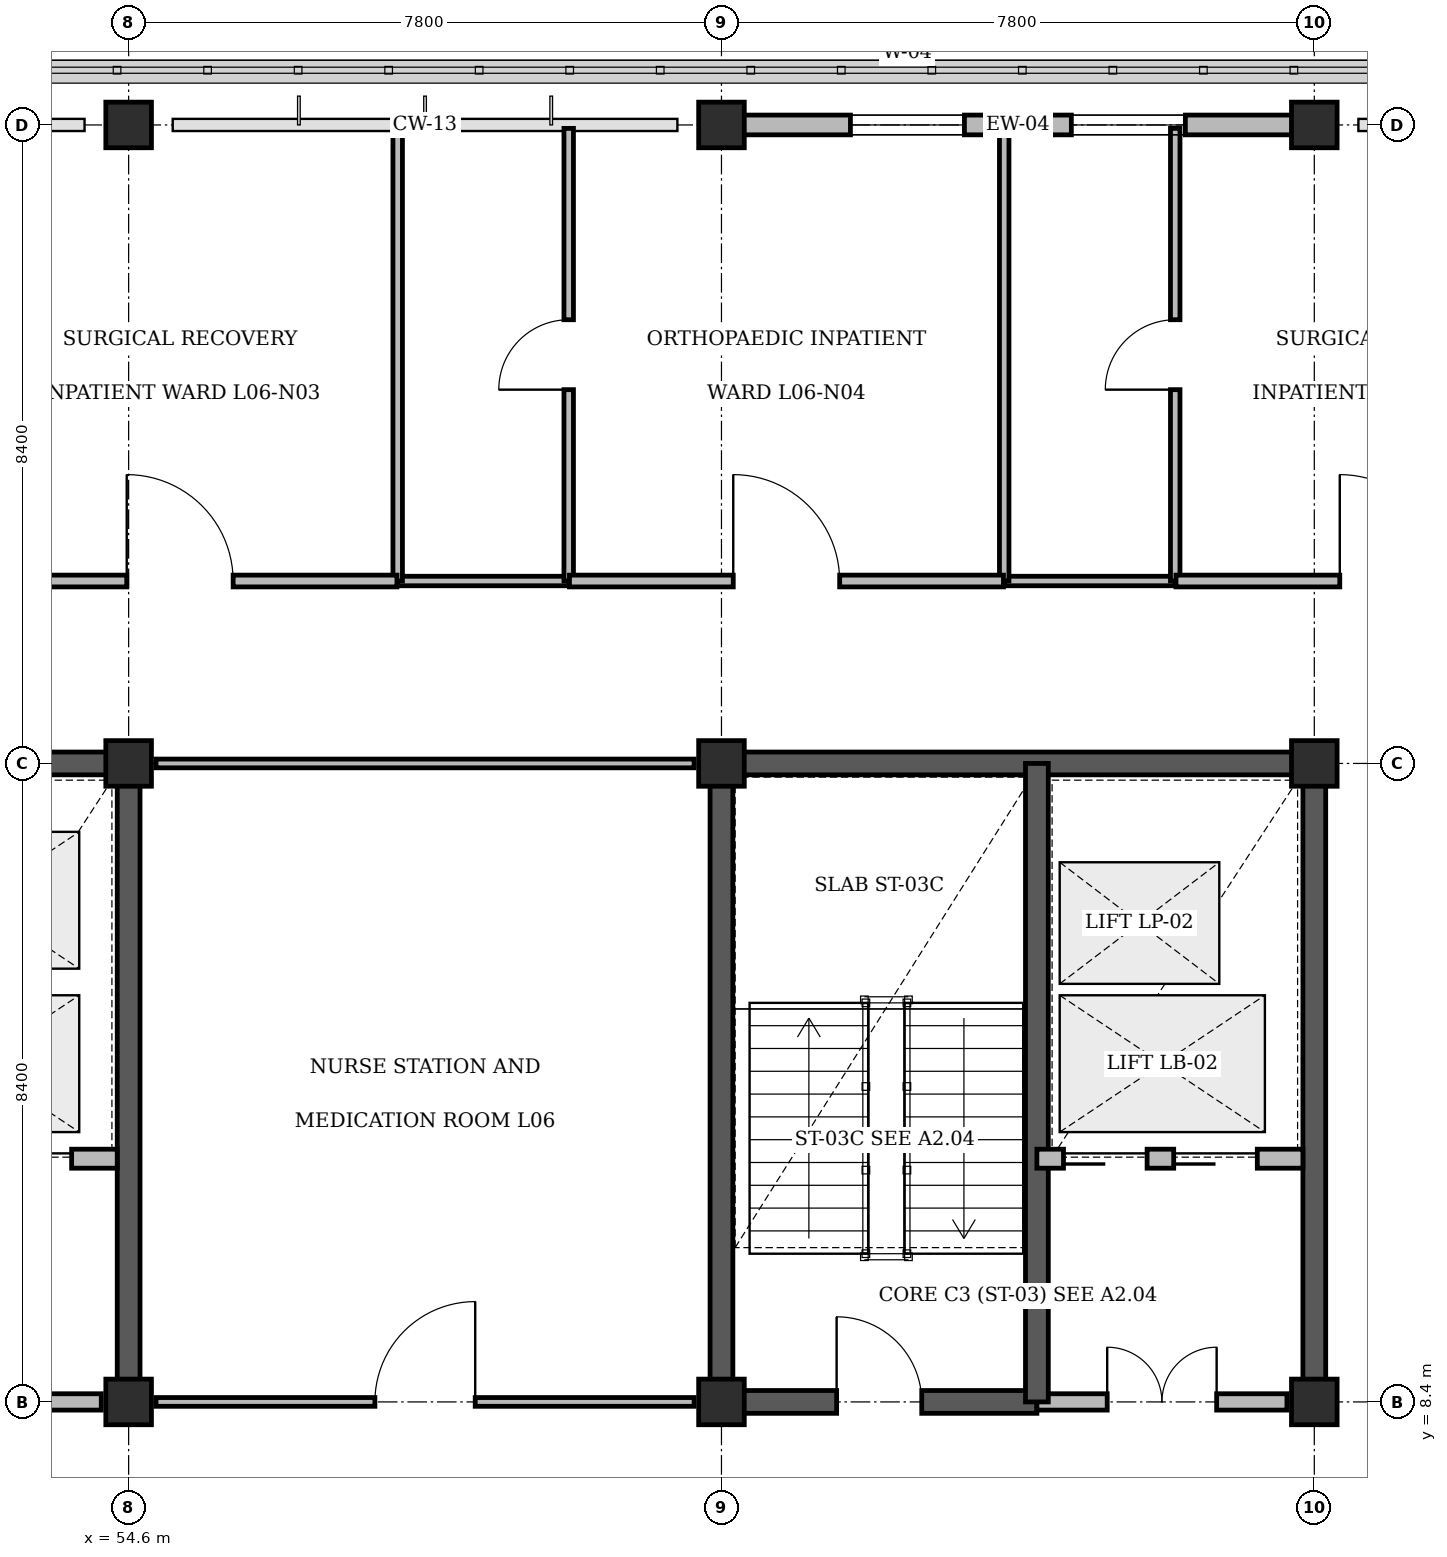
"""IFC4 building model, lengths in metres.
Left out: names, types, materials, properties, quantities, classifications, styles, units other than length and angle.
Written with IfcOpenShell. Run it as: python <this file> out.ifc"""

import sys

from ifc_helpers import new_model, si_unit, direction, frame, frame_2d, origin, origin_2d, place, context, subcontext, project, spatial, rectangle, extrude, element, fill, save


model = new_model("IFC4")
c1 = context("Model", 3, precision=1e-05, world=origin(), true_north=direction((0.0, 1.0)))
c2 = subcontext(c1, "Body", "Model", "MODEL_VIEW")
j1 = project(units=[si_unit("LENGTHUNIT", "METRE"), si_unit("PLANEANGLEUNIT", "RADIAN")], contexts=[c1])
p1 = place(None, origin())
s1 = spatial("IfcSite", under=j1, at=p1, CompositionType="ELEMENT")
p2 = place(p1, origin())
s2 = spatial("IfcBuilding", under=s1, at=p2, CompositionType="ELEMENT")
p3 = place(p2, frame((0.0, 0.0, 26.4)))
s3 = spatial("IfcBuildingStorey", under=s2, at=p3, CompositionType="ELEMENT", Elevation=26.4)
p4 = place(p3, frame((46.65, 16.8, 0.0), z_axis=(0.0, 0.0, 1.0), x_axis=(1.0, 0.0, 0.0)))
e1 = element("IfcWall", 1, at=p4, inside=s3, PredefinedType="SHEAR", context=c2, shape_type="SweptSolid", body=[
    extrude(rectangle(XDim=8.1, YDim=0.3, at=frame_2d((4.05, 0.0))), origin(), (0.0, 0.0, 1.0), 3.92),
])
p5 = place(p3, frame((54.6, 8.4, 0.0), z_axis=(0.0, 0.0, 1.0), x_axis=(0.0, 1.0, 0.0)))
e2 = element("IfcWall", 2, at=p5, inside=s3, PredefinedType="SHEAR", context=c2, shape_type="SweptSolid", body=[
    extrude(rectangle(XDim=8.4, YDim=0.3, at=frame_2d((4.2, 0.0))), origin(), (0.0, 0.0, 1.0), 3.92),
])
p6 = place(p3, frame((62.25, 16.8, 0.0), z_axis=(0.0, 0.0, 1.0), x_axis=(1.0, 0.0, 0.0)))
e3 = element("IfcWall", 3, at=p6, inside=s3, PredefinedType="SHEAR", context=c2, shape_type="SweptSolid", body=[
    extrude(rectangle(XDim=8.1, YDim=0.3, at=frame_2d((4.05, 0.0))), origin(), (0.0, 0.0, 1.0), 3.92),
])
for number, where, z_axis, x_axis in (
    (4, (62.4, 8.4, 0.0), (0.0, 0.0, 1.0), (0.0, 1.0, 0.0)),
    (5, (70.2, 8.4, 0.0), (0.0, 0.0, 1.0), (0.0, 1.0, 0.0)),
):
    element("IfcWall", number, at=place(p3, frame(where, z_axis=z_axis, x_axis=x_axis)), inside=s3, PredefinedType="SHEAR", context=c2, shape_type="SweptSolid", body=[
        extrude(rectangle(XDim=8.4, YDim=0.3, at=frame_2d((4.2, 0.0))), origin(), (0.0, 0.0, 1.0), 3.92),
    ])
for number, where, z_axis, x_axis in (
    (6, (54.6, 8.4, 0.0), (0.0, 0.0, 1.0), (1.0, 0.0, 0.0)),
    (7, (54.6, 16.8, 0.0), (0.0, 0.0, 1.0), (1.0, 0.0, 0.0)),
    (8, (54.6, 25.2, 0.0), (0.0, 0.0, 1.0), (1.0, 0.0, 0.0)),
    (9, (62.4, 8.4, 0.0), (0.0, 0.0, 1.0), (1.0, 0.0, 0.0)),
    (10, (62.4, 16.8, 0.0), (0.0, 0.0, 1.0), (1.0, 0.0, 0.0)),
    (11, (62.4, 25.2, 0.0), (0.0, 0.0, 1.0), (1.0, 0.0, 0.0)),
    (12, (70.2, 8.4, 0.0), (0.0, 0.0, 1.0), (1.0, 0.0, 0.0)),
    (13, (70.2, 16.8, 0.0), (0.0, 0.0, 1.0), (1.0, 0.0, 0.0)),
    (14, (70.2, 25.2, 0.0), (0.0, 0.0, 1.0), (1.0, 0.0, 0.0)),
):
    element("IfcColumn", number, at=place(p3, frame(where, z_axis=z_axis, x_axis=x_axis)), inside=s3, PredefinedType="COLUMN", context=c2, shape_type="SweptSolid", body=[
        extrude(rectangle(XDim=0.6, YDim=0.6, at=origin_2d()), origin(), (0.0, 0.0, 1.0), 4.2),
    ])
p7 = place(p3, frame((62.69, 25.2, 0.0), z_axis=(0.0, 0.0, 1.0), x_axis=(1.0, 0.0, 0.0)))
e15 = element("IfcWall", 15, at=p7, inside=s3, PredefinedType="STANDARD", context=c2, shape_type="SweptSolid", body=[
    extrude(rectangle(XDim=7.22, YDim=0.26, at=frame_2d((3.61, 0.0))), origin(), (0.0, 0.0, 1.0), 3.305),
])
p8 = place(p7, frame((1.407, 0.0, 0.85)))
e16 = element("IfcOpeningElement", 16, at=p8, cuts=e15, PredefinedType="OPENING", context=c2, shape_type="SweptSolid", body=[
    extrude(rectangle(XDim=1.5, YDim=1.5, at=frame_2d((0.75, 0.75))), frame((0.0, 0.14, 0.0), z_axis=(0.0, -1.0, 0.0), x_axis=(1.0, 0.0, 0.0)), (0.0, 0.0, 1.0), 0.28),
])
p9 = place(p7, frame((4.313, 0.0, 0.85)))
e17 = element("IfcOpeningElement", 17, at=p9, cuts=e15, PredefinedType="OPENING", context=c2, shape_type="SweptSolid", body=[
    extrude(rectangle(XDim=1.5, YDim=1.5, at=frame_2d((0.75, 0.75))), frame((0.0, 0.14, 0.0), z_axis=(0.0, -1.0, 0.0), x_axis=(1.0, 0.0, 0.0)), (0.0, 0.0, 1.0), 0.28),
])
p10 = place(p3, frame((50.95, 8.4, 0.0), z_axis=(0.0, 0.0, 1.0), x_axis=(1.0, 0.0, 0.0)))
e18 = element("IfcWall", 18, at=p10, inside=s3, PredefinedType="STANDARD", context=c2, shape_type="SweptSolid", body=[
    extrude(rectangle(XDim=3.29, YDim=0.215, at=frame_2d((1.645, 0.0))), origin(), (0.0, 0.0, 1.0), 3.27),
])
p11 = place(p10, frame((0.865, 0.0, 0.0)))
e19 = element("IfcOpeningElement", 19, at=p11, cuts=e18, PredefinedType="OPENING", context=c2, shape_type="SweptSolid", body=[
    extrude(rectangle(XDim=1.56, YDim=2.2, at=frame_2d((0.78, 1.1))), frame((0.0, 0.118, 0.0), z_axis=(0.0, -1.0, 0.0), x_axis=(1.0, 0.0, 0.0)), (0.0, 0.0, 1.0), 0.235),
])
p12 = place(p3, frame((50.95, 11.6, 0.0), z_axis=(0.0, 0.0, 1.0), x_axis=(1.0, 0.0, 0.0)))
e20 = element("IfcWall", 20, at=p12, inside=s3, PredefinedType="STANDARD", context=c2, shape_type="SweptSolid", body=[
    extrude(rectangle(XDim=3.5, YDim=0.25, at=frame_2d((1.75, 0.0))), origin(), (0.0, 0.0, 1.0), 3.9),
])
p13 = place(p12, frame((0.35, 0.0, 0.0)))
e21 = element("IfcOpeningElement", 21, at=p13, cuts=e20, PredefinedType="OPENING", context=c2, shape_type="SweptSolid", body=[
    extrude(rectangle(XDim=1.1, YDim=2.2, at=frame_2d((0.55, 1.1))), frame((0.0, 0.135, 0.0), z_axis=(0.0, -1.0, 0.0), x_axis=(1.0, 0.0, 0.0)), (0.0, 0.0, 1.0), 0.27),
])
p14 = place(p12, frame((1.8, 0.0, 0.0)))
e22 = element("IfcOpeningElement", 22, at=p14, cuts=e20, PredefinedType="OPENING", context=c2, shape_type="SweptSolid", body=[
    extrude(rectangle(XDim=1.1, YDim=2.2, at=frame_2d((0.55, 1.1))), frame((0.0, 0.135, 0.0), z_axis=(0.0, -1.0, 0.0), x_axis=(1.0, 0.0, 0.0)), (0.0, 0.0, 1.0), 0.27),
])
p15 = place(p3, frame((62.4, 8.4, 0.0), z_axis=(0.0, 0.0, 1.0), x_axis=(1.0, 0.0, 0.0)))
e23 = element("IfcWall", 23, at=p15, inside=s3, PredefinedType="SHEAR", context=c2, shape_type="SweptSolid", body=[
    extrude(rectangle(XDim=4.15, YDim=0.3, at=frame_2d((2.075, 0.0))), origin(), (0.0, 0.0, 1.0), 4.2),
])
p16 = place(p15, frame((1.515, 0.0, 0.0)))
e24 = element("IfcOpeningElement", 24, at=p16, cuts=e23, PredefinedType="OPENING", context=c2, shape_type="SweptSolid", body=[
    extrude(rectangle(XDim=1.12, YDim=2.15, at=frame_2d((0.56, 1.075))), frame((0.0, 0.16, 0.0), z_axis=(0.0, -1.0, 0.0), x_axis=(1.0, 0.0, 0.0)), (0.0, 0.0, 1.0), 0.32),
])
p17 = place(p3, frame((66.55, 8.4, 0.0), z_axis=(0.0, 0.0, 1.0), x_axis=(1.0, 0.0, 0.0)))
e25 = element("IfcWall", 25, at=p17, inside=s3, PredefinedType="STANDARD", context=c2, shape_type="SweptSolid", body=[
    extrude(rectangle(XDim=3.29, YDim=0.215, at=frame_2d((1.645, 0.0))), origin(), (0.0, 0.0, 1.0), 3.27),
])
p18 = place(p17, frame((0.925, 0.0, 0.0)))
e26 = element("IfcOpeningElement", 26, at=p18, cuts=e25, PredefinedType="OPENING", context=c2, shape_type="SweptSolid", body=[
    extrude(rectangle(XDim=1.44, YDim=2.2, at=frame_2d((0.72, 1.1))), frame((0.0, 0.118, 0.0), z_axis=(0.0, -1.0, 0.0), x_axis=(1.0, 0.0, 0.0)), (0.0, 0.0, 1.0), 0.235),
])
p19 = place(p3, frame((66.55, 8.4, 0.0), z_axis=(0.0, 0.0, 1.0), x_axis=(0.0, 1.0, 0.0)))
e27 = element("IfcWall", 27, at=p19, inside=s3, PredefinedType="SHEAR", context=c2, shape_type="SweptSolid", body=[
    extrude(rectangle(XDim=8.4, YDim=0.3, at=frame_2d((4.2, 0.0))), origin(), (0.0, 0.0, 1.0), 4.2),
])
p20 = place(p3, frame((66.55, 11.6, 0.0), z_axis=(0.0, 0.0, 1.0), x_axis=(1.0, 0.0, 0.0)))
e28 = element("IfcWall", 28, at=p20, inside=s3, PredefinedType="STANDARD", context=c2, shape_type="SweptSolid", body=[
    extrude(rectangle(XDim=3.5, YDim=0.25, at=frame_2d((1.75, 0.0))), origin(), (0.0, 0.0, 1.0), 3.9),
])
p21 = place(p20, frame((0.35, 0.0, 0.0)))
e29 = element("IfcOpeningElement", 29, at=p21, cuts=e28, PredefinedType="OPENING", context=c2, shape_type="SweptSolid", body=[
    extrude(rectangle(XDim=1.1, YDim=2.2, at=frame_2d((0.55, 1.1))), frame((0.0, 0.135, 0.0), z_axis=(0.0, -1.0, 0.0), x_axis=(1.0, 0.0, 0.0)), (0.0, 0.0, 1.0), 0.27),
])
p22 = place(p20, frame((1.8, 0.0, 0.0)))
e30 = element("IfcOpeningElement", 30, at=p22, cuts=e28, PredefinedType="OPENING", context=c2, shape_type="SweptSolid", body=[
    extrude(rectangle(XDim=1.1, YDim=2.2, at=frame_2d((0.55, 1.1))), frame((0.0, 0.135, 0.0), z_axis=(0.0, -1.0, 0.0), x_axis=(1.0, 0.0, 0.0)), (0.0, 0.0, 1.0), 0.27),
])
p23 = place(p3, frame((58.14, 19.2, 0.0), z_axis=(0.0, 0.0, 1.0), x_axis=(1.0, 0.0, 0.0)))
e31 = element("IfcWall", 31, at=p23, inside=s3, PredefinedType="PARTITIONING", context=c2, shape_type="SweptSolid", body=[
    extrude(rectangle(XDim=2.25, YDim=0.125, at=frame_2d((1.125, 0.0))), origin(), (0.0, 0.0, 1.0), 3.9),
])
p24 = place(p3, frame((58.14, 19.2, 0.0), z_axis=(0.0, 0.0, 1.0), x_axis=(0.0, 1.0, 0.0)))
e32 = element("IfcWall", 32, at=p24, inside=s3, PredefinedType="PARTITIONING", context=c2, shape_type="SweptSolid", body=[
    extrude(rectangle(XDim=5.955, YDim=0.125, at=frame_2d((2.978, 0.0))), origin(), (0.0, 0.0, 1.0), 3.9),
])
p25 = place(p3, frame((60.39, 19.2, 0.0), z_axis=(0.0, 0.0, 1.0), x_axis=(0.0, 1.0, 0.0)))
e33 = element("IfcWall", 33, at=p25, inside=s3, PredefinedType="PARTITIONING", context=c2, shape_type="SweptSolid", body=[
    extrude(rectangle(XDim=5.955, YDim=0.125, at=frame_2d((2.978, 0.0))), origin(), (0.0, 0.0, 1.0), 3.9),
])
p26 = place(p25, frame((2.518, 0.0, 0.0)))
e34 = element("IfcOpeningElement", 34, at=p26, cuts=e33, PredefinedType="OPENING", context=c2, shape_type="SweptSolid", body=[
    extrude(rectangle(XDim=0.92, YDim=2.1, at=frame_2d((0.46, 1.05))), frame((0.0, 0.073, 0.0), z_axis=(0.0, -1.0, 0.0), x_axis=(1.0, 0.0, 0.0)), (0.0, 0.0, 1.0), 0.145),
])
p27 = place(p3, frame((66.12, 19.2, 0.0), z_axis=(0.0, 0.0, 1.0), x_axis=(1.0, 0.0, 0.0)))
e35 = element("IfcWall", 35, at=p27, inside=s3, PredefinedType="PARTITIONING", context=c2, shape_type="SweptSolid", body=[
    extrude(rectangle(XDim=2.25, YDim=0.125, at=frame_2d((1.125, 0.0))), origin(), (0.0, 0.0, 1.0), 3.9),
])
p28 = place(p3, frame((66.12, 19.2, 0.0), z_axis=(0.0, 0.0, 1.0), x_axis=(0.0, 1.0, 0.0)))
e36 = element("IfcWall", 36, at=p28, inside=s3, PredefinedType="PARTITIONING", context=c2, shape_type="SweptSolid", body=[
    extrude(rectangle(XDim=5.955, YDim=0.125, at=frame_2d((2.978, 0.0))), origin(), (0.0, 0.0, 1.0), 3.9),
])
p29 = place(p3, frame((68.37, 19.2, 0.0), z_axis=(0.0, 0.0, 1.0), x_axis=(0.0, 1.0, 0.0)))
e37 = element("IfcWall", 37, at=p29, inside=s3, PredefinedType="PARTITIONING", context=c2, shape_type="SweptSolid", body=[
    extrude(rectangle(XDim=5.955, YDim=0.125, at=frame_2d((2.978, 0.0))), origin(), (0.0, 0.0, 1.0), 3.9),
])
p30 = place(p29, frame((2.518, 0.0, 0.0)))
e38 = element("IfcOpeningElement", 38, at=p30, cuts=e37, PredefinedType="OPENING", context=c2, shape_type="SweptSolid", body=[
    extrude(rectangle(XDim=0.92, YDim=2.1, at=frame_2d((0.46, 1.05))), frame((0.0, 0.073, 0.0), z_axis=(0.0, -1.0, 0.0), x_axis=(1.0, 0.0, 0.0)), (0.0, 0.0, 1.0), 0.145),
])
p31 = place(p3, frame((52.42, 19.2, 0.0), z_axis=(0.0, 0.0, 1.0), x_axis=(1.0, 0.0, 0.0)))
e39 = element("IfcWall", 39, at=p31, inside=s3, PredefinedType="PARTITIONING", context=c2, shape_type="SweptSolid", body=[
    extrude(rectangle(XDim=5.71, YDim=0.155, at=frame_2d((2.855, 0.0))), origin(), (0.0, 0.0, 1.0), 3.9),
])
p32 = place(p31, frame((2.155, 0.0, 0.0)))
e40 = element("IfcOpeningElement", 40, at=p32, cuts=e39, PredefinedType="OPENING", context=c2, shape_type="SweptSolid", body=[
    extrude(rectangle(XDim=1.4, YDim=2.2, at=frame_2d((0.7, 1.1))), frame((0.0, 0.087, 0.0), z_axis=(0.0, -1.0, 0.0), x_axis=(1.0, 0.0, 0.0)), (0.0, 0.0, 1.0), 0.175),
])
p33 = place(p3, frame((60.4, 19.2, 0.0), z_axis=(0.0, 0.0, 1.0), x_axis=(1.0, 0.0, 0.0)))
e41 = element("IfcWall", 41, at=p33, inside=s3, PredefinedType="PARTITIONING", context=c2, shape_type="SweptSolid", body=[
    extrude(rectangle(XDim=5.71, YDim=0.155, at=frame_2d((2.855, 0.0))), origin(), (0.0, 0.0, 1.0), 3.9),
])
p34 = place(p33, frame((2.155, 0.0, 0.0)))
e42 = element("IfcOpeningElement", 42, at=p34, cuts=e41, PredefinedType="OPENING", context=c2, shape_type="SweptSolid", body=[
    extrude(rectangle(XDim=1.4, YDim=2.2, at=frame_2d((0.7, 1.1))), frame((0.0, 0.087, 0.0), z_axis=(0.0, -1.0, 0.0), x_axis=(1.0, 0.0, 0.0)), (0.0, 0.0, 1.0), 0.175),
])
p35 = place(p3, frame((68.38, 19.2, 0.0), z_axis=(0.0, 0.0, 1.0), x_axis=(1.0, 0.0, 0.0)))
e43 = element("IfcWall", 43, at=p35, inside=s3, PredefinedType="PARTITIONING", context=c2, shape_type="SweptSolid", body=[
    extrude(rectangle(XDim=5.71, YDim=0.155, at=frame_2d((2.855, 0.0))), origin(), (0.0, 0.0, 1.0), 3.9),
])
p36 = place(p35, frame((2.155, 0.0, 0.0)))
e44 = element("IfcOpeningElement", 44, at=p36, cuts=e43, PredefinedType="OPENING", context=c2, shape_type="SweptSolid", body=[
    extrude(rectangle(XDim=1.4, YDim=2.2, at=frame_2d((0.7, 1.1))), frame((0.0, 0.087, 0.0), z_axis=(0.0, -1.0, 0.0), x_axis=(1.0, 0.0, 0.0)), (0.0, 0.0, 1.0), 0.175),
])
p37 = place(p3, frame((54.96, 8.4, 0.0), z_axis=(0.0, 0.0, 1.0), x_axis=(1.0, 0.0, 0.0)))
e45 = element("IfcWall", 45, at=p37, inside=s3, PredefinedType="PARTITIONING", context=c2, shape_type="SweptSolid", body=[
    extrude(rectangle(XDim=7.08, YDim=0.115, at=frame_2d((3.54, 0.0))), origin(), (0.0, 0.0, 1.0), 3.27),
])
p38 = place(p37, frame((2.88, 0.0, 0.0)))
e46 = element("IfcOpeningElement", 46, at=p38, cuts=e45, PredefinedType="OPENING", context=c2, shape_type="SweptSolid", body=[
    extrude(rectangle(XDim=1.32, YDim=2.15, at=frame_2d((0.66, 1.075))), frame((0.0, 0.067, 0.0), z_axis=(0.0, -1.0, 0.0), x_axis=(1.0, 0.0, 0.0)), (0.0, 0.0, 1.0), 0.135),
])
p39 = place(p3, frame((54.96, 16.8, 0.0), z_axis=(0.0, 0.0, 1.0), x_axis=(1.0, 0.0, 0.0)))
e47 = element("IfcWall", 47, at=p39, inside=s3, PredefinedType="PARTITIONING", context=c2, shape_type="SweptSolid", body=[
    extrude(rectangle(XDim=7.08, YDim=0.115, at=frame_2d((3.54, 0.0))), origin(), (0.0, 0.0, 1.0), 3.27),
])
p40 = place(p8, origin())
e48 = element("IfcWindow", 48, at=p40, inside=s3, PartitioningType="SINGLE_PANEL", PredefinedType="WINDOW", context=c2, shape_type="SweptSolid", body=[
    extrude(rectangle(XDim=1.5, YDim=1.5, at=frame_2d((0.75, 0.75))), frame((0.0, 0.03, 0.0), z_axis=(0.0, -1.0, 0.0), x_axis=(1.0, 0.0, 0.0)), (0.0, 0.0, 1.0), 0.06),
])
fill(e16, e48)
p41 = place(p9, origin())
e49 = element("IfcWindow", 49, at=p41, inside=s3, PartitioningType="SINGLE_PANEL", PredefinedType="WINDOW", context=c2, shape_type="SweptSolid", body=[
    extrude(rectangle(XDim=1.5, YDim=1.5, at=frame_2d((0.75, 0.75))), frame((0.0, 0.03, 0.0), z_axis=(0.0, -1.0, 0.0), x_axis=(1.0, 0.0, 0.0)), (0.0, 0.0, 1.0), 0.06),
])
fill(e17, e49)
p42 = place(p14, origin())
e50 = element("IfcDoor", 50, at=p42, inside=s3, OperationType="SLIDING_TO_LEFT", PredefinedType="DOOR", context=c2, shape_type="SweptSolid", body=[
    extrude(rectangle(XDim=1.1, YDim=2.2, at=frame_2d((0.55, 1.1))), frame((0.0, 0.025, 0.0), z_axis=(0.0, -1.0, 0.0), x_axis=(1.0, 0.0, 0.0)), (0.0, 0.0, 1.0), 0.05),
])
fill(e22, e50)
p43 = place(p16, origin())
e51 = element("IfcDoor", 51, at=p43, inside=s3, OperationType="SINGLE_SWING_LEFT", PredefinedType="DOOR", context=c2, shape_type="SweptSolid", body=[
    extrude(rectangle(XDim=1.12, YDim=2.15, at=frame_2d((0.56, 1.075))), frame((0.0, 0.025, 0.0), z_axis=(0.0, -1.0, 0.0), x_axis=(1.0, 0.0, 0.0)), (0.0, 0.0, 1.0), 0.05),
])
fill(e24, e51)
p44 = place(p18, origin())
e52 = element("IfcDoor", 52, at=p44, inside=s3, OperationType="DOUBLE_DOOR_SINGLE_SWING", PredefinedType="DOOR", context=c2, shape_type="SweptSolid", body=[
    extrude(rectangle(XDim=1.44, YDim=2.2, at=frame_2d((0.72, 1.1))), frame((0.0, 0.025, 0.0), z_axis=(0.0, -1.0, 0.0), x_axis=(1.0, 0.0, 0.0)), (0.0, 0.0, 1.0), 0.05),
])
fill(e26, e52)
p45 = place(p21, origin())
e53 = element("IfcDoor", 53, at=p45, inside=s3, OperationType="SLIDING_TO_LEFT", PredefinedType="DOOR", context=c2, shape_type="SweptSolid", body=[
    extrude(rectangle(XDim=1.1, YDim=2.2, at=frame_2d((0.55, 1.1))), frame((0.0, 0.025, 0.0), z_axis=(0.0, -1.0, 0.0), x_axis=(1.0, 0.0, 0.0)), (0.0, 0.0, 1.0), 0.05),
])
fill(e29, e53)
p46 = place(p22, origin())
e54 = element("IfcDoor", 54, at=p46, inside=s3, OperationType="SLIDING_TO_LEFT", PredefinedType="DOOR", context=c2, shape_type="SweptSolid", body=[
    extrude(rectangle(XDim=1.1, YDim=2.2, at=frame_2d((0.55, 1.1))), frame((0.0, 0.025, 0.0), z_axis=(0.0, -1.0, 0.0), x_axis=(1.0, 0.0, 0.0)), (0.0, 0.0, 1.0), 0.05),
])
fill(e30, e54)
p47 = place(p26, origin())
e55 = element("IfcDoor", 55, at=p47, inside=s3, OperationType="SINGLE_SWING_LEFT", PredefinedType="DOOR", context=c2, shape_type="SweptSolid", body=[
    extrude(rectangle(XDim=0.92, YDim=2.1, at=frame_2d((0.46, 1.05))), frame((0.0, 0.025, 0.0), z_axis=(0.0, -1.0, 0.0), x_axis=(1.0, 0.0, 0.0)), (0.0, 0.0, 1.0), 0.05),
])
fill(e34, e55)
p48 = place(p30, origin())
e56 = element("IfcDoor", 56, at=p48, inside=s3, OperationType="SINGLE_SWING_LEFT", PredefinedType="DOOR", context=c2, shape_type="SweptSolid", body=[
    extrude(rectangle(XDim=0.92, YDim=2.1, at=frame_2d((0.46, 1.05))), frame((0.0, 0.025, 0.0), z_axis=(0.0, -1.0, 0.0), x_axis=(1.0, 0.0, 0.0)), (0.0, 0.0, 1.0), 0.05),
])
fill(e38, e56)
p49 = place(p32, origin())
e57 = element("IfcDoor", 57, at=p49, inside=s3, OperationType="SINGLE_SWING_LEFT", PredefinedType="DOOR", context=c2, shape_type="SweptSolid", body=[
    extrude(rectangle(XDim=1.4, YDim=2.2, at=frame_2d((0.7, 1.1))), frame((0.0, 0.025, 0.0), z_axis=(0.0, -1.0, 0.0), x_axis=(1.0, 0.0, 0.0)), (0.0, 0.0, 1.0), 0.05),
])
fill(e40, e57)
p50 = place(p34, origin())
e58 = element("IfcDoor", 58, at=p50, inside=s3, OperationType="SINGLE_SWING_LEFT", PredefinedType="DOOR", context=c2, shape_type="SweptSolid", body=[
    extrude(rectangle(XDim=1.4, YDim=2.2, at=frame_2d((0.7, 1.1))), frame((0.0, 0.025, 0.0), z_axis=(0.0, -1.0, 0.0), x_axis=(1.0, 0.0, 0.0)), (0.0, 0.0, 1.0), 0.05),
])
fill(e42, e58)
p51 = place(p36, origin())
e59 = element("IfcDoor", 59, at=p51, inside=s3, OperationType="SINGLE_SWING_LEFT", PredefinedType="DOOR", context=c2, shape_type="SweptSolid", body=[
    extrude(rectangle(XDim=1.4, YDim=2.2, at=frame_2d((0.7, 1.1))), frame((0.0, 0.025, 0.0), z_axis=(0.0, -1.0, 0.0), x_axis=(1.0, 0.0, 0.0)), (0.0, 0.0, 1.0), 0.05),
])
fill(e44, e59)
p52 = place(p38, origin())
e60 = element("IfcDoor", 60, at=p52, inside=s3, OperationType="SINGLE_SWING_RIGHT", PredefinedType="DOOR", context=c2, shape_type="SweptSolid", body=[
    extrude(rectangle(XDim=1.32, YDim=2.15, at=frame_2d((0.66, 1.075))), frame((0.0, 0.025, 0.0), z_axis=(0.0, -1.0, 0.0), x_axis=(1.0, 0.0, 0.0)), (0.0, 0.0, 1.0), 0.05),
])
fill(e46, e60)
save(model, sys.argv[1])
